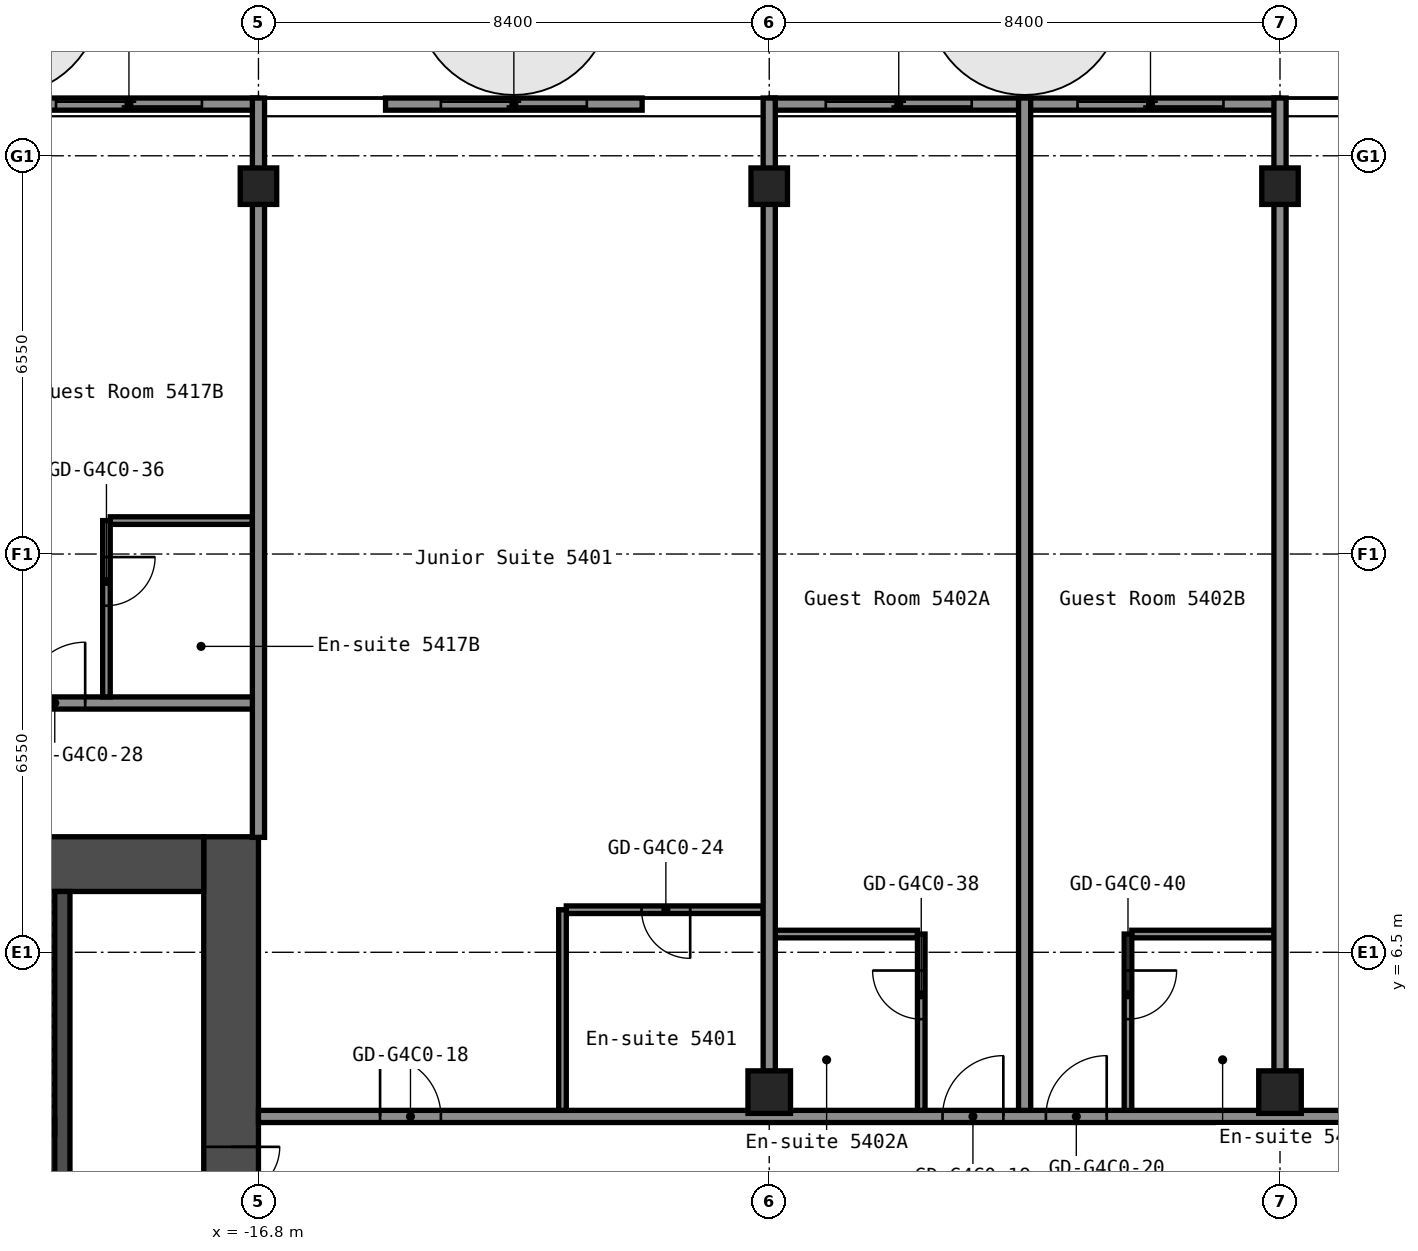
"""IFC4 building model, lengths in metres.
Left out: names, types, materials, properties, quantities, classifications, styles, units other than length and angle.
Written with IfcOpenShell. Run it as: python <this file> out.ifc"""

import sys

from ifc_helpers import new_model, si_unit, direction, frame, frame_2d, origin, origin_2d, place, context, subcontext, project, spatial, rectangle, hollow_rectangle, extrude, element, fill, save


model = new_model("IFC4")
c1 = context("Model", 3, precision=1e-05, world=origin(), true_north=direction((0.0, 1.0)))
c2 = subcontext(c1, "Body", "Model", "MODEL_VIEW")
j1 = project(units=[si_unit("LENGTHUNIT", "METRE"), si_unit("PLANEANGLEUNIT", "RADIAN")], contexts=[c1])
p1 = place(None, origin())
s1 = spatial("IfcSite", under=j1, at=p1, CompositionType="ELEMENT")
p2 = place(p1, origin())
s2 = spatial("IfcBuilding", under=s1, at=p2, CompositionType="ELEMENT")
p3 = place(p2, frame((0.0, 0.0, 193.0)))
s3 = spatial("IfcBuildingStorey", under=s2, at=p3, CompositionType="ELEMENT", Elevation=193.0)
p4 = place(p3, frame((-16.8, 19.1, 0.0), z_axis=(0.0, 0.0, 1.0), x_axis=(1.0, 0.0, 0.0)))
e1 = element("IfcColumn", 1, at=p4, inside=s3, PredefinedType="COLUMN", context=c2, shape_type="SweptSolid", body=[
    extrude(hollow_rectangle(XDim=0.6, YDim=0.6, WallThickness=0.025, InnerFilletRadius=0.038, OuterFilletRadius=0.062, at=origin_2d()), origin(), (0.0, 0.0, 1.0), 2.75),
])
p5 = place(p3, frame((-8.4, 4.2, 0.0), z_axis=(0.0, 0.0, 1.0), x_axis=(1.0, 0.0, 0.0)))
e2 = element("IfcColumn", 2, at=p5, inside=s3, PredefinedType="COLUMN", context=c2, shape_type="SweptSolid", body=[
    extrude(hollow_rectangle(XDim=0.7, YDim=0.7, WallThickness=0.028, at=origin_2d()), origin(), (0.0, 0.0, 1.0), 2.75),
])
p6 = place(p3, frame((-8.4, 19.1, 0.0), z_axis=(0.0, 0.0, 1.0), x_axis=(1.0, 0.0, 0.0)))
e3 = element("IfcColumn", 3, at=p6, inside=s3, PredefinedType="COLUMN", context=c2, shape_type="SweptSolid", body=[
    extrude(hollow_rectangle(XDim=0.6, YDim=0.6, WallThickness=0.025, InnerFilletRadius=0.038, OuterFilletRadius=0.062, at=origin_2d()), origin(), (0.0, 0.0, 1.0), 2.75),
])
p7 = place(p3, frame((0.0, 4.2, 0.0), z_axis=(0.0, 0.0, 1.0), x_axis=(1.0, 0.0, 0.0)))
e4 = element("IfcColumn", 4, at=p7, inside=s3, PredefinedType="COLUMN", context=c2, shape_type="SweptSolid", body=[
    extrude(hollow_rectangle(XDim=0.7, YDim=0.7, WallThickness=0.028, at=origin_2d()), origin(), (0.0, 0.0, 1.0), 2.75),
])
p8 = place(p3, frame((0.0, 19.1, 0.0), z_axis=(0.0, 0.0, 1.0), x_axis=(1.0, 0.0, 0.0)))
e5 = element("IfcColumn", 5, at=p8, inside=s3, PredefinedType="COLUMN", context=c2, shape_type="SweptSolid", body=[
    extrude(hollow_rectangle(XDim=0.6, YDim=0.6, WallThickness=0.025, InnerFilletRadius=0.038, OuterFilletRadius=0.062, at=origin_2d()), origin(), (0.0, 0.0, 1.0), 2.75),
])
p9 = place(p3, frame((-17.25, -8.4, 0.0), z_axis=(0.0, 0.0, 1.0), x_axis=(0.0, 1.0, 0.0)))
e6 = element("IfcWall", 6, at=p9, inside=s3, PredefinedType="SHEAR", context=c2, shape_type="SweptSolid", body=[
    extrude(rectangle(XDim=16.8, YDim=0.9, at=frame_2d((8.4, 0.0))), origin(), (0.0, 0.0, 1.0), 2.75),
])
p10 = place(p9, frame((10.1, 0.0, 0.0)))
e7 = element("IfcOpeningElement", 7, at=p10, cuts=e6, PredefinedType="OPENING", context=c2, shape_type="SweptSolid", body=[
    extrude(rectangle(XDim=1.6, YDim=2.1, at=frame_2d((0.8, 1.05))), frame((0.0, 0.46, 0.0), z_axis=(0.0, -1.0, 0.0), x_axis=(1.0, 0.0, 0.0)), (0.0, 0.0, 1.0), 0.92),
])
p11 = place(p3, frame((-32.7, 7.95, 0.0), z_axis=(0.0, 0.0, 1.0), x_axis=(1.0, 0.0, 0.0)))
e8 = element("IfcWall", 8, at=p11, inside=s3, PredefinedType="SHEAR", context=c2, shape_type="SweptSolid", body=[
    extrude(rectangle(XDim=15.0, YDim=0.9, at=frame_2d((7.5, 0.0))), origin(), (0.0, 0.0, 1.0), 2.75),
])
p12 = place(p11, frame((3.4, 0.0, 0.0)))
e9 = element("IfcOpeningElement", 9, at=p12, cuts=e8, PredefinedType="OPENING", context=c2, shape_type="SweptSolid", body=[
    extrude(rectangle(XDim=1.2, YDim=2.1, at=frame_2d((0.6, 1.05))), frame((0.0, 0.46, 0.0), z_axis=(0.0, -1.0, 0.0), x_axis=(1.0, 0.0, 0.0)), (0.0, 0.0, 1.0), 0.92),
])
p13 = place(p11, frame((0.75, 0.0, 0.0)))
e10 = element("IfcOpeningElement", 10, at=p13, cuts=e8, PredefinedType="OPENING", context=c2, shape_type="SweptSolid", body=[
    extrude(rectangle(XDim=0.9, YDim=2.1, at=frame_2d((0.45, 1.05))), frame((0.0, 0.46, 0.0), z_axis=(0.0, -1.0, 0.0), x_axis=(1.0, 0.0, 0.0)), (0.0, 0.0, 1.0), 0.92),
])
p14 = place(p3, frame((-20.025, 1.2, 0.0), z_axis=(0.0, 0.0, 1.0), x_axis=(0.0, 1.0, 0.0)))
e11 = element("IfcWall", 11, at=p14, inside=s3, PredefinedType="SHEAR", context=c2, shape_type="SweptSolid", body=[
    extrude(rectangle(XDim=6.3, YDim=0.25, at=frame_2d((3.15, 0.0))), origin(), (0.0, 0.0, 1.0), 2.75),
])
p15 = place(p3, frame((-27.65, 3.625, 0.0), z_axis=(0.0, 0.0, 1.0), x_axis=(1.0, 0.0, 0.0)))
e12 = element("IfcWall", 12, at=p15, inside=s3, PredefinedType="SHEAR", context=c2, shape_type="SweptSolid", body=[
    extrude(rectangle(XDim=7.5, YDim=0.25, at=frame_2d((3.75, 0.0))), origin(), (0.0, 0.0, 1.0), 2.75),
])
p16 = place(p3, frame((-16.8, 3.8, 0.0), z_axis=(0.0, 0.0, 1.0), x_axis=(1.0, 0.0, 0.0)))
e13 = element("IfcWall", 13, at=p16, inside=s3, PredefinedType="PARTITIONING", context=c2, shape_type="SweptSolid", body=[
    extrude(rectangle(XDim=33.6, YDim=0.2, at=frame_2d((16.8, 0.0))), origin(), (0.0, 0.0, 1.0), 2.75),
])
p17 = place(p16, frame((2.0, 0.0, 0.0)))
e14 = element("IfcOpeningElement", 14, at=p17, cuts=e13, PredefinedType="OPENING", context=c2, shape_type="SweptSolid", body=[
    extrude(rectangle(XDim=1.0, YDim=2.1, at=frame_2d((0.5, 1.05))), frame((0.0, 0.11, 0.0), z_axis=(0.0, -1.0, 0.0), x_axis=(1.0, 0.0, 0.0)), (0.0, 0.0, 1.0), 0.22),
])
p18 = place(p16, frame((11.25, 0.0, 0.0)))
e15 = element("IfcOpeningElement", 15, at=p18, cuts=e13, PredefinedType="OPENING", context=c2, shape_type="SweptSolid", body=[
    extrude(rectangle(XDim=1.0, YDim=2.1, at=frame_2d((0.5, 1.05))), frame((0.0, 0.11, 0.0), z_axis=(0.0, -1.0, 0.0), x_axis=(1.0, 0.0, 0.0)), (0.0, 0.0, 1.0), 0.22),
])
p19 = place(p16, frame((12.95, 0.0, 0.0)))
e16 = element("IfcOpeningElement", 16, at=p19, cuts=e13, PredefinedType="OPENING", context=c2, shape_type="SweptSolid", body=[
    extrude(rectangle(XDim=1.0, YDim=2.1, at=frame_2d((0.5, 1.05))), frame((0.0, 0.11, 0.0), z_axis=(0.0, -1.0, 0.0), x_axis=(1.0, 0.0, 0.0)), (0.0, 0.0, 1.0), 0.22),
])
p20 = place(p16, frame((20.5, 0.0, 0.0)))
e17 = element("IfcOpeningElement", 17, at=p20, cuts=e13, PredefinedType="OPENING", context=c2, shape_type="SweptSolid", body=[
    extrude(rectangle(XDim=1.0, YDim=2.1, at=frame_2d((0.5, 1.05))), frame((0.0, 0.11, 0.0), z_axis=(0.0, -1.0, 0.0), x_axis=(1.0, 0.0, 0.0)), (0.0, 0.0, 1.0), 0.22),
])
p21 = place(p16, frame((28.05, 0.0, 0.0)))
e18 = element("IfcOpeningElement", 18, at=p21, cuts=e13, PredefinedType="OPENING", context=c2, shape_type="SweptSolid", body=[
    extrude(rectangle(XDim=1.0, YDim=2.1, at=frame_2d((0.5, 1.05))), frame((0.0, 0.11, 0.0), z_axis=(0.0, -1.0, 0.0), x_axis=(1.0, 0.0, 0.0)), (0.0, 0.0, 1.0), 0.22),
])
p22 = place(p16, frame((29.75, 0.0, 0.0)))
e19 = element("IfcOpeningElement", 19, at=p22, cuts=e13, PredefinedType="OPENING", context=c2, shape_type="SweptSolid", body=[
    extrude(rectangle(XDim=1.0, YDim=2.1, at=frame_2d((0.5, 1.05))), frame((0.0, 0.11, 0.0), z_axis=(0.0, -1.0, 0.0), x_axis=(1.0, 0.0, 0.0)), (0.0, 0.0, 1.0), 0.22),
])
p23 = place(p3, frame((-8.3, 6.8, 0.0), z_axis=(0.0, 0.0, 1.0), x_axis=(1.0, 0.0, 0.0)))
e20 = element("IfcWall", 20, at=p23, inside=s3, PredefinedType="PARTITIONING", context=c2, shape_type="SweptSolid", body=[
    extrude(rectangle(XDim=2.338, YDim=0.125, at=frame_2d((1.169, 0.0))), origin(), (0.0, 0.0, 1.0), 2.75),
])
p24 = place(p3, frame((-2.438, 6.8, 0.0), z_axis=(0.0, 0.0, 1.0), x_axis=(1.0, 0.0, 0.0)))
e21 = element("IfcWall", 21, at=p24, inside=s3, PredefinedType="PARTITIONING", context=c2, shape_type="SweptSolid", body=[
    extrude(rectangle(XDim=2.337, YDim=0.125, at=frame_2d((1.169, 0.0))), origin(), (0.0, 0.0, 1.0), 2.75),
])
p25 = place(p3, frame((-11.738, 7.2, 0.0), z_axis=(0.0, 0.0, 1.0), x_axis=(1.0, 0.0, 0.0)))
e22 = element("IfcWall", 22, at=p25, inside=s3, PredefinedType="PARTITIONING", context=c2, shape_type="SweptSolid", body=[
    extrude(rectangle(XDim=3.238, YDim=0.125, at=frame_2d((1.619, 0.0))), origin(), (0.0, 0.0, 1.0), 2.75),
])
p26 = place(p25, frame((1.238, 0.0, 0.0)))
e23 = element("IfcOpeningElement", 23, at=p26, cuts=e22, PredefinedType="OPENING", context=c2, shape_type="SweptSolid", body=[
    extrude(rectangle(XDim=0.8, YDim=2.1, at=frame_2d((0.4, 1.05))), frame((0.0, 0.073, 0.0), z_axis=(0.0, -1.0, 0.0), x_axis=(1.0, 0.0, 0.0)), (0.0, 0.0, 1.0), 0.145),
])
p27 = place(p3, frame((-38.1, 10.6, 0.0), z_axis=(0.0, 0.0, 1.0), x_axis=(1.0, 0.0, 0.0)))
e24 = element("IfcWall", 24, at=p27, inside=s3, PredefinedType="PARTITIONING", context=c2, shape_type="SweptSolid", body=[
    extrude(rectangle(XDim=21.3, YDim=0.2, at=frame_2d((10.65, 0.0))), origin(), (0.0, 0.0, 1.0), 2.75),
])
p28 = place(p27, frame((1.95, 0.0, 0.0)))
e25 = element("IfcOpeningElement", 25, at=p28, cuts=e24, PredefinedType="OPENING", context=c2, shape_type="SweptSolid", body=[
    extrude(rectangle(XDim=0.9, YDim=2.1, at=frame_2d((0.45, 1.05))), frame((0.0, 0.11, 0.0), z_axis=(0.0, -1.0, 0.0), x_axis=(1.0, 0.0, 0.0)), (0.0, 0.0, 1.0), 0.22),
])
p29 = place(p27, frame((6.4, 0.0, 0.0)))
e26 = element("IfcOpeningElement", 26, at=p29, cuts=e24, PredefinedType="OPENING", context=c2, shape_type="SweptSolid", body=[
    extrude(rectangle(XDim=1.0, YDim=2.1, at=frame_2d((0.5, 1.05))), frame((0.0, 0.11, 0.0), z_axis=(0.0, -1.0, 0.0), x_axis=(1.0, 0.0, 0.0)), (0.0, 0.0, 1.0), 0.22),
])
p30 = place(p27, frame((15.75, 0.0, 0.0)))
e27 = element("IfcOpeningElement", 27, at=p30, cuts=e24, PredefinedType="OPENING", context=c2, shape_type="SweptSolid", body=[
    extrude(rectangle(XDim=1.0, YDim=2.1, at=frame_2d((0.5, 1.05))), frame((0.0, 0.11, 0.0), z_axis=(0.0, -1.0, 0.0), x_axis=(1.0, 0.0, 0.0)), (0.0, 0.0, 1.0), 0.22),
])
p31 = place(p27, frame((17.45, 0.0, 0.0)))
e28 = element("IfcOpeningElement", 28, at=p31, cuts=e24, PredefinedType="OPENING", context=c2, shape_type="SweptSolid", body=[
    extrude(rectangle(XDim=1.0, YDim=2.1, at=frame_2d((0.5, 1.05))), frame((0.0, 0.11, 0.0), z_axis=(0.0, -1.0, 0.0), x_axis=(1.0, 0.0, 0.0)), (0.0, 0.0, 1.0), 0.22),
])
p32 = place(p3, frame((-19.238, 13.6, 0.0), z_axis=(0.0, 0.0, 1.0), x_axis=(1.0, 0.0, 0.0)))
e29 = element("IfcWall", 29, at=p32, inside=s3, PredefinedType="PARTITIONING", context=c2, shape_type="SweptSolid", body=[
    extrude(rectangle(XDim=2.338, YDim=0.125, at=frame_2d((1.169, 0.0))), origin(), (0.0, 0.0, 1.0), 2.75),
])
p33 = place(p3, frame((-19.3, 10.7, 0.0), z_axis=(0.0, 0.0, 1.0), x_axis=(0.0, 1.0, 0.0)))
e30 = element("IfcWall", 30, at=p33, inside=s3, PredefinedType="PARTITIONING", context=c2, shape_type="SweptSolid", body=[
    extrude(rectangle(XDim=2.9, YDim=0.125, at=frame_2d((1.45, 0.0))), origin(), (0.0, 0.0, 1.0), 2.75),
])
p34 = place(p33, frame((1.5, 0.0, 0.0)))
e31 = element("IfcOpeningElement", 31, at=p34, cuts=e30, PredefinedType="OPENING", context=c2, shape_type="SweptSolid", body=[
    extrude(rectangle(XDim=0.8, YDim=2.1, at=frame_2d((0.4, 1.05))), frame((0.0, 0.073, 0.0), z_axis=(0.0, -1.0, 0.0), x_axis=(1.0, 0.0, 0.0)), (0.0, 0.0, 1.0), 0.145),
])
p35 = place(p3, frame((-16.8, 8.39, 0.0), z_axis=(0.0, 0.0, 1.0), x_axis=(0.0, 1.0, 0.0)))
e32 = element("IfcWall", 32, at=p35, inside=s3, PredefinedType="PARTITIONING", context=c2, shape_type="SweptSolid", body=[
    extrude(rectangle(XDim=12.16, YDim=0.2, at=frame_2d((6.08, 0.0))), origin(), (0.0, 0.0, 1.0), 2.75),
])
p36 = place(p3, frame((-11.8, 3.9, 0.0), z_axis=(0.0, 0.0, 1.0), x_axis=(0.0, 1.0, 0.0)))
e33 = element("IfcWall", 33, at=p36, inside=s3, PredefinedType="PARTITIONING", context=c2, shape_type="SweptSolid", body=[
    extrude(rectangle(XDim=3.3, YDim=0.125, at=frame_2d((1.65, 0.0))), origin(), (0.0, 0.0, 1.0), 2.75),
])
p37 = place(p3, frame((-8.4, 4.54, 0.0), z_axis=(0.0, 0.0, 1.0), x_axis=(0.0, 1.0, 0.0)))
e34 = element("IfcWall", 34, at=p37, inside=s3, PredefinedType="PARTITIONING", context=c2, shape_type="SweptSolid", body=[
    extrude(rectangle(XDim=16.01, YDim=0.2, at=frame_2d((8.005, 0.0))), origin(), (0.0, 0.0, 1.0), 2.75),
])
p38 = place(p3, frame((-5.9, 3.9, 0.0), z_axis=(0.0, 0.0, 1.0), x_axis=(0.0, 1.0, 0.0)))
e35 = element("IfcWall", 35, at=p38, inside=s3, PredefinedType="PARTITIONING", context=c2, shape_type="SweptSolid", body=[
    extrude(rectangle(XDim=2.9, YDim=0.125, at=frame_2d((1.45, 0.0))), origin(), (0.0, 0.0, 1.0), 2.75),
])
p39 = place(p38, frame((1.5, 0.0, 0.0)))
e36 = element("IfcOpeningElement", 36, at=p39, cuts=e35, PredefinedType="OPENING", context=c2, shape_type="SweptSolid", body=[
    extrude(rectangle(XDim=0.8, YDim=2.1, at=frame_2d((0.4, 1.05))), frame((0.0, 0.073, 0.0), z_axis=(0.0, -1.0, 0.0), x_axis=(1.0, 0.0, 0.0)), (0.0, 0.0, 1.0), 0.145),
])
p40 = place(p3, frame((-4.2, 3.9, 0.0), z_axis=(0.0, 0.0, 1.0), x_axis=(0.0, 1.0, 0.0)))
e37 = element("IfcWall", 37, at=p40, inside=s3, PredefinedType="PARTITIONING", context=c2, shape_type="SweptSolid", body=[
    extrude(rectangle(XDim=16.65, YDim=0.2, at=frame_2d((8.325, 0.0))), origin(), (0.0, 0.0, 1.0), 2.75),
])
p41 = place(p3, frame((-2.5, 3.9, 0.0), z_axis=(0.0, 0.0, 1.0), x_axis=(0.0, 1.0, 0.0)))
e38 = element("IfcWall", 38, at=p41, inside=s3, PredefinedType="PARTITIONING", context=c2, shape_type="SweptSolid", body=[
    extrude(rectangle(XDim=2.9, YDim=0.125, at=frame_2d((1.45, 0.0))), origin(), (0.0, 0.0, 1.0), 2.75),
])
p42 = place(p41, frame((1.5, 0.0, 0.0)))
e39 = element("IfcOpeningElement", 39, at=p42, cuts=e38, PredefinedType="OPENING", context=c2, shape_type="SweptSolid", body=[
    extrude(rectangle(XDim=0.8, YDim=2.1, at=frame_2d((0.4, 1.05))), frame((0.0, 0.073, 0.0), z_axis=(0.0, -1.0, 0.0), x_axis=(1.0, 0.0, 0.0)), (0.0, 0.0, 1.0), 0.145),
])
p43 = place(p3, frame((0.0, 4.54, 0.0), z_axis=(0.0, 0.0, 1.0), x_axis=(0.0, 1.0, 0.0)))
e40 = element("IfcWall", 40, at=p43, inside=s3, PredefinedType="PARTITIONING", context=c2, shape_type="SweptSolid", body=[
    extrude(rectangle(XDim=16.01, YDim=0.2, at=frame_2d((8.005, 0.0))), origin(), (0.0, 0.0, 1.0), 2.75),
])
p44 = place(p3, frame((-0.02, 20.45, 0.0), z_axis=(0.0, 0.0, 1.0), x_axis=(-1.0, 0.0, 0.0)))
p45 = place(p44, frame((0.91, 0.0, 0.0)))
p46 = place(p45, frame((2.4, 0.0, 0.0), z_axis=(0.0, 0.0, 1.0), x_axis=(-1.0, 0.0, 0.0)))
e41 = element("IfcDoor", 41, at=p46, inside=s3, OperationType="SLIDING_TO_LEFT", PredefinedType="DOOR", context=c2, shape_type="SweptSolid", body=[
    extrude(rectangle(XDim=2.4, YDim=2.2, at=frame_2d((1.2, 1.1))), frame((0.0, 0.025, 0.0), z_axis=(0.0, -1.0, 0.0), x_axis=(1.0, 0.0, 0.0)), (0.0, 0.0, 1.0), 0.05),
])
p47 = place(p3, frame((-4.16, 20.45, 0.0), z_axis=(0.0, 0.0, 1.0), x_axis=(-1.0, 0.0, 0.0)))
p48 = place(p47, frame((0.91, 0.0, 0.0)))
p49 = place(p48, frame((2.4, 0.0, 0.0), z_axis=(0.0, 0.0, 1.0), x_axis=(-1.0, 0.0, 0.0)))
e42 = element("IfcDoor", 42, at=p49, inside=s3, OperationType="SLIDING_TO_LEFT", PredefinedType="DOOR", context=c2, shape_type="SweptSolid", body=[
    extrude(rectangle(XDim=2.4, YDim=2.2, at=frame_2d((1.2, 1.1))), frame((0.0, 0.025, 0.0), z_axis=(0.0, -1.0, 0.0), x_axis=(1.0, 0.0, 0.0)), (0.0, 0.0, 1.0), 0.05),
])
p50 = place(p3, frame((-10.49, 20.45, 0.0), z_axis=(0.0, 0.0, 1.0), x_axis=(-1.0, 0.0, 0.0)))
p51 = place(p50, frame((0.91, 0.0, 0.0)))
p52 = place(p51, frame((2.4, 0.0, 0.0), z_axis=(0.0, 0.0, 1.0), x_axis=(-1.0, 0.0, 0.0)))
e43 = element("IfcDoor", 43, at=p52, inside=s3, OperationType="SLIDING_TO_LEFT", PredefinedType="DOOR", context=c2, shape_type="SweptSolid", body=[
    extrude(rectangle(XDim=2.4, YDim=2.2, at=frame_2d((1.2, 1.1))), frame((0.0, 0.025, 0.0), z_axis=(0.0, -1.0, 0.0), x_axis=(1.0, 0.0, 0.0)), (0.0, 0.0, 1.0), 0.05),
])
p53 = place(p3, frame((-16.82, 20.45, 0.0), z_axis=(0.0, 0.0, 1.0), x_axis=(-1.0, 0.0, 0.0)))
p54 = place(p53, frame((0.91, 0.0, 0.0)))
p55 = place(p54, frame((2.4, 0.0, 0.0), z_axis=(0.0, 0.0, 1.0), x_axis=(-1.0, 0.0, 0.0)))
e44 = element("IfcDoor", 44, at=p55, inside=s3, OperationType="SLIDING_TO_LEFT", PredefinedType="DOOR", context=c2, shape_type="SweptSolid", body=[
    extrude(rectangle(XDim=2.4, YDim=2.2, at=frame_2d((1.2, 1.1))), frame((0.0, 0.025, 0.0), z_axis=(0.0, -1.0, 0.0), x_axis=(1.0, 0.0, 0.0)), (0.0, 0.0, 1.0), 0.05),
])
p56 = place(p10, origin())
e45 = element("IfcDoor", 45, at=p56, inside=s3, OperationType="DOUBLE_DOOR_SINGLE_SWING", PredefinedType="DOOR", context=c2, shape_type="SweptSolid", body=[
    extrude(rectangle(XDim=1.6, YDim=2.1, at=frame_2d((0.8, 1.05))), frame((0.0, 0.025, 0.0), z_axis=(0.0, -1.0, 0.0), x_axis=(1.0, 0.0, 0.0)), (0.0, 0.0, 1.0), 0.05),
])
fill(e7, e45)
p57 = place(p17, origin())
e46 = element("IfcDoor", 46, at=p57, inside=s3, OperationType="SINGLE_SWING_RIGHT", PredefinedType="DOOR", context=c2, shape_type="SweptSolid", body=[
    extrude(rectangle(XDim=1.0, YDim=2.1, at=frame_2d((0.5, 1.05))), frame((0.0, 0.025, 0.0), z_axis=(0.0, -1.0, 0.0), x_axis=(1.0, 0.0, 0.0)), (0.0, 0.0, 1.0), 0.05),
])
fill(e14, e46)
p58 = place(p18, origin())
e47 = element("IfcDoor", 47, at=p58, inside=s3, OperationType="SINGLE_SWING_LEFT", PredefinedType="DOOR", context=c2, shape_type="SweptSolid", body=[
    extrude(rectangle(XDim=1.0, YDim=2.1, at=frame_2d((0.5, 1.05))), frame((0.0, 0.025, 0.0), z_axis=(0.0, -1.0, 0.0), x_axis=(1.0, 0.0, 0.0)), (0.0, 0.0, 1.0), 0.05),
])
fill(e15, e47)
p59 = place(p19, origin())
e48 = element("IfcDoor", 48, at=p59, inside=s3, OperationType="SINGLE_SWING_LEFT", PredefinedType="DOOR", context=c2, shape_type="SweptSolid", body=[
    extrude(rectangle(XDim=1.0, YDim=2.1, at=frame_2d((0.5, 1.05))), frame((0.0, 0.025, 0.0), z_axis=(0.0, -1.0, 0.0), x_axis=(1.0, 0.0, 0.0)), (0.0, 0.0, 1.0), 0.05),
])
fill(e16, e48)
p60 = place(p26, origin())
e49 = element("IfcDoor", 49, at=p60, inside=s3, OperationType="SINGLE_SWING_RIGHT", PredefinedType="DOOR", context=c2, shape_type="SweptSolid", body=[
    extrude(rectangle(XDim=0.8, YDim=2.1, at=frame_2d((0.4, 1.05))), frame((0.0, 0.025, 0.0), z_axis=(0.0, -1.0, 0.0), x_axis=(1.0, 0.0, 0.0)), (0.0, 0.0, 1.0), 0.05),
])
fill(e23, e49)
p61 = place(p31, origin())
e50 = element("IfcDoor", 50, at=p61, inside=s3, OperationType="SINGLE_SWING_LEFT", PredefinedType="DOOR", context=c2, shape_type="SweptSolid", body=[
    extrude(rectangle(XDim=1.0, YDim=2.1, at=frame_2d((0.5, 1.05))), frame((0.0, 0.025, 0.0), z_axis=(0.0, -1.0, 0.0), x_axis=(1.0, 0.0, 0.0)), (0.0, 0.0, 1.0), 0.05),
])
fill(e28, e50)
p62 = place(p34, origin())
e51 = element("IfcDoor", 51, at=p62, inside=s3, OperationType="SINGLE_SWING_RIGHT", PredefinedType="DOOR", context=c2, shape_type="SweptSolid", body=[
    extrude(rectangle(XDim=0.8, YDim=2.1, at=frame_2d((0.4, 1.05))), frame((0.0, 0.025, 0.0), z_axis=(0.0, -1.0, 0.0), x_axis=(1.0, 0.0, 0.0)), (0.0, 0.0, 1.0), 0.05),
])
fill(e31, e51)
p63 = place(p39, origin())
e52 = element("IfcDoor", 52, at=p63, inside=s3, OperationType="SINGLE_SWING_LEFT", PredefinedType="DOOR", context=c2, shape_type="SweptSolid", body=[
    extrude(rectangle(XDim=0.8, YDim=2.1, at=frame_2d((0.4, 1.05))), frame((0.0, 0.025, 0.0), z_axis=(0.0, -1.0, 0.0), x_axis=(1.0, 0.0, 0.0)), (0.0, 0.0, 1.0), 0.05),
])
fill(e36, e52)
p64 = place(p42, origin())
e53 = element("IfcDoor", 53, at=p64, inside=s3, OperationType="SINGLE_SWING_RIGHT", PredefinedType="DOOR", context=c2, shape_type="SweptSolid", body=[
    extrude(rectangle(XDim=0.8, YDim=2.1, at=frame_2d((0.4, 1.05))), frame((0.0, 0.025, 0.0), z_axis=(0.0, -1.0, 0.0), x_axis=(1.0, 0.0, 0.0)), (0.0, 0.0, 1.0), 0.05),
])
fill(e39, e53)
save(model, sys.argv[1])
